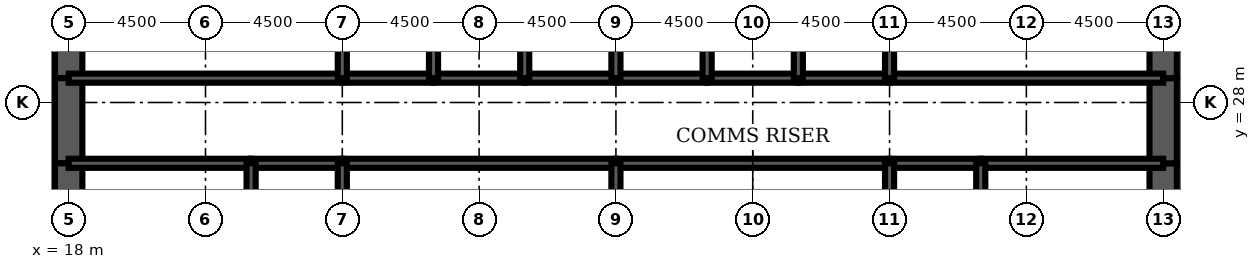
"""IFC4 building model, lengths in metres.
Left out: names, types, materials, properties, quantities, classifications, styles, units other than length and angle.
Written with IfcOpenShell. Run it as: python <this file> out.ifc"""

import sys

from ifc_helpers import new_model, si_unit, direction, frame, frame_2d, origin, place, context, subcontext, project, spatial, rectangle, extrude, element, fill, save


model = new_model("IFC4")
c1 = context("Model", 3, precision=1e-05, world=origin(), true_north=direction((0.0, 1.0)))
c2 = subcontext(c1, "Body", "Model", "MODEL_VIEW")
j1 = project(units=[si_unit("LENGTHUNIT", "METRE"), si_unit("PLANEANGLEUNIT", "RADIAN")], contexts=[c1])
p1 = place(None, origin())
s1 = spatial("IfcSite", under=j1, at=p1, CompositionType="ELEMENT")
p2 = place(p1, origin())
s2 = spatial("IfcBuilding", under=s1, at=p2, CompositionType="ELEMENT")
p3 = place(p2, frame((0.0, 0.0, 113.1)))
s3 = spatial("IfcBuildingStorey", under=s2, at=p3, CompositionType="ELEMENT", Elevation=113.1)
p4 = place(p3, frame((18.0, 32.0, 0.0), z_axis=(0.0, 0.0, 1.0), x_axis=(0.0, -1.0, 0.0)))
e1 = element("IfcWall", 1, at=p4, inside=s3, PredefinedType="SHEAR", context=c2, shape_type="SweptSolid", body=[
    extrude(rectangle(XDim=3.2, YDim=0.9, at=frame_2d((1.6, 0.0))), origin(), (0.0, 0.0, 1.0), 4.2),
])
p5 = place(p3, frame((18.0, 28.8, 0.0), z_axis=(0.0, 0.0, 1.0), x_axis=(0.0, -1.0, 0.0)))
e2 = element("IfcWall", 2, at=p5, inside=s3, PredefinedType="SHEAR", context=c2, shape_type="SweptSolid", body=[
    extrude(rectangle(XDim=2.8, YDim=0.9, at=frame_2d((1.4, 0.0))), origin(), (0.0, 0.0, 1.0), 4.2),
])
p6 = place(p5, frame((0.4, 0.0, 0.0)))
e3 = element("IfcOpeningElement", 3, at=p6, cuts=e2, PredefinedType="OPENING", context=c2, shape_type="SweptSolid", body=[
    extrude(rectangle(XDim=1.8, YDim=2.1, at=frame_2d((0.9, 1.05))), frame((0.0, 0.46, 0.0), z_axis=(0.0, -1.0, 0.0), x_axis=(1.0, 0.0, 0.0)), (0.0, 0.0, 1.0), 0.92),
])
for number, where, z_axis, x_axis in (
    (4, (18.0, 26.0, 0.0), (0.0, 0.0, 1.0), (0.0, -1.0, 0.0)),
    (5, (54.0, 22.0, 0.0), (0.0, 0.0, 1.0), (0.0, 1.0, 0.0)),
):
    element("IfcWall", number, at=place(p3, frame(where, z_axis=z_axis, x_axis=x_axis)), inside=s3, PredefinedType="SHEAR", context=c2, shape_type="SweptSolid", body=[
        extrude(rectangle(XDim=4.0, YDim=0.9, at=frame_2d((2.0, 0.0))), origin(), (0.0, 0.0, 1.0), 4.2),
    ])
p7 = place(p3, frame((54.0, 26.0, 0.0), z_axis=(0.0, 0.0, 1.0), x_axis=(0.0, 1.0, 0.0)))
e6 = element("IfcWall", 6, at=p7, inside=s3, PredefinedType="SHEAR", context=c2, shape_type="SweptSolid", body=[
    extrude(rectangle(XDim=2.8, YDim=0.9, at=frame_2d((1.4, 0.0))), origin(), (0.0, 0.0, 1.0), 4.2),
])
p8 = place(p7, frame((0.6, 0.0, 0.0)))
e7 = element("IfcOpeningElement", 7, at=p8, cuts=e6, PredefinedType="OPENING", context=c2, shape_type="SweptSolid", body=[
    extrude(rectangle(XDim=1.8, YDim=2.1, at=frame_2d((0.9, 1.05))), frame((0.0, 0.46, 0.0), z_axis=(0.0, -1.0, 0.0), x_axis=(1.0, 0.0, 0.0)), (0.0, 0.0, 1.0), 0.92),
])
p9 = place(p3, frame((54.0, 28.8, 0.0), z_axis=(0.0, 0.0, 1.0), x_axis=(0.0, 1.0, 0.0)))
e8 = element("IfcWall", 8, at=p9, inside=s3, PredefinedType="SHEAR", context=c2, shape_type="SweptSolid", body=[
    extrude(rectangle(XDim=3.2, YDim=0.9, at=frame_2d((1.6, 0.0))), origin(), (0.0, 0.0, 1.0), 4.2),
])
p10 = place(p3, frame((18.0, 28.8, 0.0), z_axis=(0.0, 0.0, 1.0), x_axis=(1.0, 0.0, 0.0)))
e9 = element("IfcWall", 9, at=p10, inside=s3, PredefinedType="SOLIDWALL", context=c2, shape_type="SweptSolid", body=[
    extrude(rectangle(XDim=9.0, YDim=0.3, at=frame_2d((4.5, 0.0))), origin(), (0.0, 0.0, 1.0), 4.2),
])
p11 = place(p10, frame((0.65, 0.0, 0.0)))
e10 = element("IfcOpeningElement", 10, at=p11, cuts=e9, PredefinedType="OPENING", context=c2, shape_type="SweptSolid", body=[
    extrude(rectangle(XDim=1.0, YDim=2.1, at=frame_2d((0.5, 1.05))), frame((0.0, 0.16, 0.0), z_axis=(0.0, -1.0, 0.0), x_axis=(1.0, 0.0, 0.0)), (0.0, 0.0, 1.0), 0.32),
])
p12 = place(p3, frame((27.0, 28.8, 0.0), z_axis=(0.0, 0.0, 1.0), x_axis=(1.0, 0.0, 0.0)))
e11 = element("IfcWall", 11, at=p12, inside=s3, PredefinedType="SOLIDWALL", context=c2, shape_type="SweptSolid", body=[
    extrude(rectangle(XDim=3.0, YDim=0.3, at=frame_2d((1.5, 0.0))), origin(), (0.0, 0.0, 1.0), 4.2),
])
p13 = place(p12, frame((0.95, 0.0, 0.0)))
e12 = element("IfcOpeningElement", 12, at=p13, cuts=e11, PredefinedType="OPENING", context=c2, shape_type="SweptSolid", body=[
    extrude(rectangle(XDim=1.1, YDim=2.2, at=frame_2d((0.55, 1.1))), frame((0.0, 0.16, 0.0), z_axis=(0.0, -1.0, 0.0), x_axis=(1.0, 0.0, 0.0)), (0.0, 0.0, 1.0), 0.32),
])
p14 = place(p3, frame((30.0, 28.8, 0.0), z_axis=(0.0, 0.0, 1.0), x_axis=(1.0, 0.0, 0.0)))
e13 = element("IfcWall", 13, at=p14, inside=s3, PredefinedType="SOLIDWALL", context=c2, shape_type="SweptSolid", body=[
    extrude(rectangle(XDim=3.0, YDim=0.3, at=frame_2d((1.5, 0.0))), origin(), (0.0, 0.0, 1.0), 4.2),
])
p15 = place(p14, frame((0.95, 0.0, 0.0)))
e14 = element("IfcOpeningElement", 14, at=p15, cuts=e13, PredefinedType="OPENING", context=c2, shape_type="SweptSolid", body=[
    extrude(rectangle(XDim=1.1, YDim=2.2, at=frame_2d((0.55, 1.1))), frame((0.0, 0.16, 0.0), z_axis=(0.0, -1.0, 0.0), x_axis=(1.0, 0.0, 0.0)), (0.0, 0.0, 1.0), 0.32),
])
p16 = place(p3, frame((33.0, 28.8, 0.0), z_axis=(0.0, 0.0, 1.0), x_axis=(1.0, 0.0, 0.0)))
e15 = element("IfcWall", 15, at=p16, inside=s3, PredefinedType="SOLIDWALL", context=c2, shape_type="SweptSolid", body=[
    extrude(rectangle(XDim=3.0, YDim=0.3, at=frame_2d((1.5, 0.0))), origin(), (0.0, 0.0, 1.0), 4.2),
])
p17 = place(p16, frame((0.95, 0.0, 0.0)))
e16 = element("IfcOpeningElement", 16, at=p17, cuts=e15, PredefinedType="OPENING", context=c2, shape_type="SweptSolid", body=[
    extrude(rectangle(XDim=1.1, YDim=2.2, at=frame_2d((0.55, 1.1))), frame((0.0, 0.16, 0.0), z_axis=(0.0, -1.0, 0.0), x_axis=(1.0, 0.0, 0.0)), (0.0, 0.0, 1.0), 0.32),
])
for number, where, z_axis, x_axis in (
    (17, (36.0, 28.8, 0.0), (0.0, 0.0, 1.0), (1.0, 0.0, 0.0)),
    (18, (39.0, 28.8, 0.0), (0.0, 0.0, 1.0), (1.0, 0.0, 0.0)),
):
    element("IfcWall", number, at=place(p3, frame(where, z_axis=z_axis, x_axis=x_axis)), inside=s3, PredefinedType="SOLIDWALL", context=c2, shape_type="SweptSolid", body=[
        extrude(rectangle(XDim=3.0, YDim=0.3, at=frame_2d((1.5, 0.0))), origin(), (0.0, 0.0, 1.0), 4.2),
    ])
p18 = place(p3, frame((42.0, 28.8, 0.0), z_axis=(0.0, 0.0, 1.0), x_axis=(1.0, 0.0, 0.0)))
e19 = element("IfcWall", 19, at=p18, inside=s3, PredefinedType="SOLIDWALL", context=c2, shape_type="SweptSolid", body=[
    extrude(rectangle(XDim=3.0, YDim=0.3, at=frame_2d((1.5, 0.0))), origin(), (0.0, 0.0, 1.0), 4.2),
])
p19 = place(p18, frame((0.95, 0.0, 0.0)))
e20 = element("IfcOpeningElement", 20, at=p19, cuts=e19, PredefinedType="OPENING", context=c2, shape_type="SweptSolid", body=[
    extrude(rectangle(XDim=1.1, YDim=2.2, at=frame_2d((0.55, 1.1))), frame((0.0, 0.16, 0.0), z_axis=(0.0, -1.0, 0.0), x_axis=(1.0, 0.0, 0.0)), (0.0, 0.0, 1.0), 0.32),
])
p20 = place(p3, frame((45.0, 28.8, 0.0), z_axis=(0.0, 0.0, 1.0), x_axis=(1.0, 0.0, 0.0)))
e21 = element("IfcWall", 21, at=p20, inside=s3, PredefinedType="SOLIDWALL", context=c2, shape_type="SweptSolid", body=[
    extrude(rectangle(XDim=9.0, YDim=0.3, at=frame_2d((4.5, 0.0))), origin(), (0.0, 0.0, 1.0), 4.2),
])
p21 = place(p20, frame((7.35, 0.0, 0.0)))
e22 = element("IfcOpeningElement", 22, at=p21, cuts=e21, PredefinedType="OPENING", context=c2, shape_type="SweptSolid", body=[
    extrude(rectangle(XDim=1.0, YDim=2.1, at=frame_2d((0.5, 1.05))), frame((0.0, 0.16, 0.0), z_axis=(0.0, -1.0, 0.0), x_axis=(1.0, 0.0, 0.0)), (0.0, 0.0, 1.0), 0.32),
])
p22 = place(p3, frame((18.0, 26.0, 0.0), z_axis=(0.0, 0.0, 1.0), x_axis=(1.0, 0.0, 0.0)))
e23 = element("IfcWall", 23, at=p22, inside=s3, PredefinedType="SOLIDWALL", context=c2, shape_type="SweptSolid", body=[
    extrude(rectangle(XDim=6.0, YDim=0.3, at=frame_2d((3.0, 0.0))), origin(), (0.0, 0.0, 1.0), 4.2),
])
p23 = place(p3, frame((24.0, 26.0, 0.0), z_axis=(0.0, 0.0, 1.0), x_axis=(1.0, 0.0, 0.0)))
e24 = element("IfcWall", 24, at=p23, inside=s3, PredefinedType="SOLIDWALL", context=c2, shape_type="SweptSolid", body=[
    extrude(rectangle(XDim=3.0, YDim=0.3, at=frame_2d((1.5, 0.0))), origin(), (0.0, 0.0, 1.0), 4.2),
])
for number, where, z_axis, x_axis in (
    (25, (27.0, 26.0, 0.0), (0.0, 0.0, 1.0), (1.0, 0.0, 0.0)),
    (26, (36.0, 26.0, 0.0), (0.0, 0.0, 1.0), (1.0, 0.0, 0.0)),
):
    element("IfcWall", number, at=place(p3, frame(where, z_axis=z_axis, x_axis=x_axis)), inside=s3, PredefinedType="SOLIDWALL", context=c2, shape_type="SweptSolid", body=[
        extrude(rectangle(XDim=9.0, YDim=0.3, at=frame_2d((4.5, 0.0))), origin(), (0.0, 0.0, 1.0), 4.2),
    ])
p24 = place(p3, frame((45.0, 26.0, 0.0), z_axis=(0.0, 0.0, 1.0), x_axis=(1.0, 0.0, 0.0)))
e27 = element("IfcWall", 27, at=p24, inside=s3, PredefinedType="SOLIDWALL", context=c2, shape_type="SweptSolid", body=[
    extrude(rectangle(XDim=3.0, YDim=0.3, at=frame_2d((1.5, 0.0))), origin(), (0.0, 0.0, 1.0), 4.2),
])
p25 = place(p3, frame((48.0, 26.0, 0.0), z_axis=(0.0, 0.0, 1.0), x_axis=(1.0, 0.0, 0.0)))
e28 = element("IfcWall", 28, at=p25, inside=s3, PredefinedType="SOLIDWALL", context=c2, shape_type="SweptSolid", body=[
    extrude(rectangle(XDim=6.0, YDim=0.3, at=frame_2d((3.0, 0.0))), origin(), (0.0, 0.0, 1.0), 4.2),
])
for number, where, z_axis, x_axis in (
    (29, (27.0, 28.8, 0.0), (0.0, 0.0, 1.0), (0.0, 1.0, 0.0)),
    (30, (30.0, 28.8, 0.0), (0.0, 0.0, 1.0), (0.0, 1.0, 0.0)),
    (31, (33.0, 28.8, 0.0), (0.0, 0.0, 1.0), (0.0, 1.0, 0.0)),
    (32, (36.0, 28.8, 0.0), (0.0, 0.0, 1.0), (0.0, 1.0, 0.0)),
    (33, (39.0, 28.8, 0.0), (0.0, 0.0, 1.0), (0.0, 1.0, 0.0)),
    (34, (42.0, 28.8, 0.0), (0.0, 0.0, 1.0), (0.0, 1.0, 0.0)),
    (35, (45.0, 28.8, 0.0), (0.0, 0.0, 1.0), (0.0, 1.0, 0.0)),
):
    element("IfcWall", number, at=place(p3, frame(where, z_axis=z_axis, x_axis=x_axis)), inside=s3, PredefinedType="SOLIDWALL", context=c2, shape_type="SweptSolid", body=[
        extrude(rectangle(XDim=3.2, YDim=0.3, at=frame_2d((1.6, 0.0))), origin(), (0.0, 0.0, 1.0), 4.2),
    ])
for number, where, z_axis, x_axis in (
    (36, (24.0, 22.0, 0.0), (0.0, 0.0, 1.0), (0.0, 1.0, 0.0)),
    (37, (27.0, 22.0, 0.0), (0.0, 0.0, 1.0), (0.0, 1.0, 0.0)),
    (38, (36.0, 22.0, 0.0), (0.0, 0.0, 1.0), (0.0, 1.0, 0.0)),
    (39, (45.0, 22.0, 0.0), (0.0, 0.0, 1.0), (0.0, 1.0, 0.0)),
    (40, (48.0, 22.0, 0.0), (0.0, 0.0, 1.0), (0.0, 1.0, 0.0)),
):
    element("IfcWall", number, at=place(p3, frame(where, z_axis=z_axis, x_axis=x_axis)), inside=s3, PredefinedType="SOLIDWALL", context=c2, shape_type="SweptSolid", body=[
        extrude(rectangle(XDim=4.0, YDim=0.3, at=frame_2d((2.0, 0.0))), origin(), (0.0, 0.0, 1.0), 4.2),
    ])
p26 = place(p3, frame((39.0, 22.15, 0.0), z_axis=(0.0, 0.0, 1.0), x_axis=(0.0, 1.0, 0.0)))
e41 = element("IfcWall", 41, at=p26, inside=s3, PredefinedType="PARTITIONING", context=c2, shape_type="SweptSolid", body=[
    extrude(rectangle(XDim=3.7, YDim=0.15, at=frame_2d((1.85, 0.0))), origin(), (0.0, 0.0, 1.0), 3.0),
])
p27 = place(p26, frame((2.2, 0.0, 0.0)))
e42 = element("IfcOpeningElement", 42, at=p27, cuts=e41, PredefinedType="OPENING", context=c2, shape_type="SweptSolid", body=[
    extrude(rectangle(XDim=1.0, YDim=2.1, at=frame_2d((0.5, 1.05))), frame((0.0, 0.085, 0.0), z_axis=(0.0, -1.0, 0.0), x_axis=(1.0, 0.0, 0.0)), (0.0, 0.0, 1.0), 0.17),
])
for number, where, z_axis, x_axis in (
    (43, (20.625, 22.15, 0.0), (0.0, 0.0, 1.0), (0.0, 1.0, 0.0)),
    (44, (51.375, 22.15, 0.0), (0.0, 0.0, 1.0), (0.0, 1.0, 0.0)),
):
    element("IfcWall", number, at=place(p3, frame(where, z_axis=z_axis, x_axis=x_axis)), inside=s3, PredefinedType="PARTITIONING", context=c2, shape_type="SweptSolid", body=[
        extrude(rectangle(XDim=3.7, YDim=0.15, at=frame_2d((1.85, 0.0))), origin(), (0.0, 0.0, 1.0), 3.0),
    ])
p28 = place(p27, origin())
e45 = element("IfcDoor", 45, at=p28, inside=s3, OperationType="SINGLE_SWING_RIGHT", PredefinedType="DOOR", context=c2, shape_type="SweptSolid", body=[
    extrude(rectangle(XDim=1.0, YDim=2.1, at=frame_2d((0.5, 1.05))), frame((0.0, 0.025, 0.0), z_axis=(0.0, -1.0, 0.0), x_axis=(1.0, 0.0, 0.0)), (0.0, 0.0, 1.0), 0.05),
])
fill(e42, e45)
p29 = place(p19, origin())
e46 = element("IfcDoor", 46, at=p29, inside=s3, OperationType="DOUBLE_DOOR_SLIDING", PredefinedType="USERDEFINED", context=c2, shape_type="SweptSolid", body=[
    extrude(rectangle(XDim=1.1, YDim=2.2, at=frame_2d((0.55, 1.1))), frame((0.0, 0.025, 0.0), z_axis=(0.0, -1.0, 0.0), x_axis=(1.0, 0.0, 0.0)), (0.0, 0.0, 1.0), 0.05),
])
fill(e20, e46)
p30 = place(p13, origin())
e47 = element("IfcDoor", 47, at=p30, inside=s3, OperationType="DOUBLE_DOOR_SLIDING", PredefinedType="USERDEFINED", context=c2, shape_type="SweptSolid", body=[
    extrude(rectangle(XDim=1.1, YDim=2.2, at=frame_2d((0.55, 1.1))), frame((0.0, 0.025, 0.0), z_axis=(0.0, -1.0, 0.0), x_axis=(1.0, 0.0, 0.0)), (0.0, 0.0, 1.0), 0.05),
])
fill(e12, e47)
p31 = place(p15, origin())
e48 = element("IfcDoor", 48, at=p31, inside=s3, OperationType="DOUBLE_DOOR_SLIDING", PredefinedType="USERDEFINED", context=c2, shape_type="SweptSolid", body=[
    extrude(rectangle(XDim=1.1, YDim=2.2, at=frame_2d((0.55, 1.1))), frame((0.0, 0.025, 0.0), z_axis=(0.0, -1.0, 0.0), x_axis=(1.0, 0.0, 0.0)), (0.0, 0.0, 1.0), 0.05),
])
fill(e14, e48)
p32 = place(p17, origin())
e49 = element("IfcDoor", 49, at=p32, inside=s3, OperationType="DOUBLE_DOOR_SLIDING", PredefinedType="USERDEFINED", context=c2, shape_type="SweptSolid", body=[
    extrude(rectangle(XDim=1.1, YDim=2.2, at=frame_2d((0.55, 1.1))), frame((0.0, 0.025, 0.0), z_axis=(0.0, -1.0, 0.0), x_axis=(1.0, 0.0, 0.0)), (0.0, 0.0, 1.0), 0.05),
])
fill(e16, e49)
p33 = place(p11, origin())
e50 = element("IfcDoor", 50, at=p33, inside=s3, OperationType="SINGLE_SWING_LEFT", PredefinedType="DOOR", context=c2, shape_type="SweptSolid", body=[
    extrude(rectangle(XDim=1.0, YDim=2.1, at=frame_2d((0.5, 1.05))), frame((0.0, 0.025, 0.0), z_axis=(0.0, -1.0, 0.0), x_axis=(1.0, 0.0, 0.0)), (0.0, 0.0, 1.0), 0.05),
])
fill(e10, e50)
p34 = place(p21, origin())
e51 = element("IfcDoor", 51, at=p34, inside=s3, OperationType="SINGLE_SWING_RIGHT", PredefinedType="DOOR", context=c2, shape_type="SweptSolid", body=[
    extrude(rectangle(XDim=1.0, YDim=2.1, at=frame_2d((0.5, 1.05))), frame((0.0, 0.025, 0.0), z_axis=(0.0, -1.0, 0.0), x_axis=(1.0, 0.0, 0.0)), (0.0, 0.0, 1.0), 0.05),
])
fill(e22, e51)
p35 = place(p6, origin())
e52 = element("IfcDoor", 52, at=p35, inside=s3, OperationType="SINGLE_SWING_LEFT", PredefinedType="DOOR", context=c2, shape_type="SweptSolid", body=[
    extrude(rectangle(XDim=1.8, YDim=2.1, at=frame_2d((0.9, 1.05))), frame((0.0, 0.45, 0.0), z_axis=(0.0, -1.0, 0.0), x_axis=(1.0, 0.0, 0.0)), (0.0, 0.0, 1.0), 0.899),
])
fill(e3, e52)
p36 = place(p8, origin())
e53 = element("IfcDoor", 53, at=p36, inside=s3, OperationType="SINGLE_SWING_LEFT", PredefinedType="DOOR", context=c2, shape_type="SweptSolid", body=[
    extrude(rectangle(XDim=1.8, YDim=2.1, at=frame_2d((0.9, 1.05))), frame((0.0, 0.45, 0.0), z_axis=(0.0, -1.0, 0.0), x_axis=(1.0, 0.0, 0.0)), (0.0, 0.0, 1.0), 0.899),
])
fill(e7, e53)
save(model, sys.argv[1])
